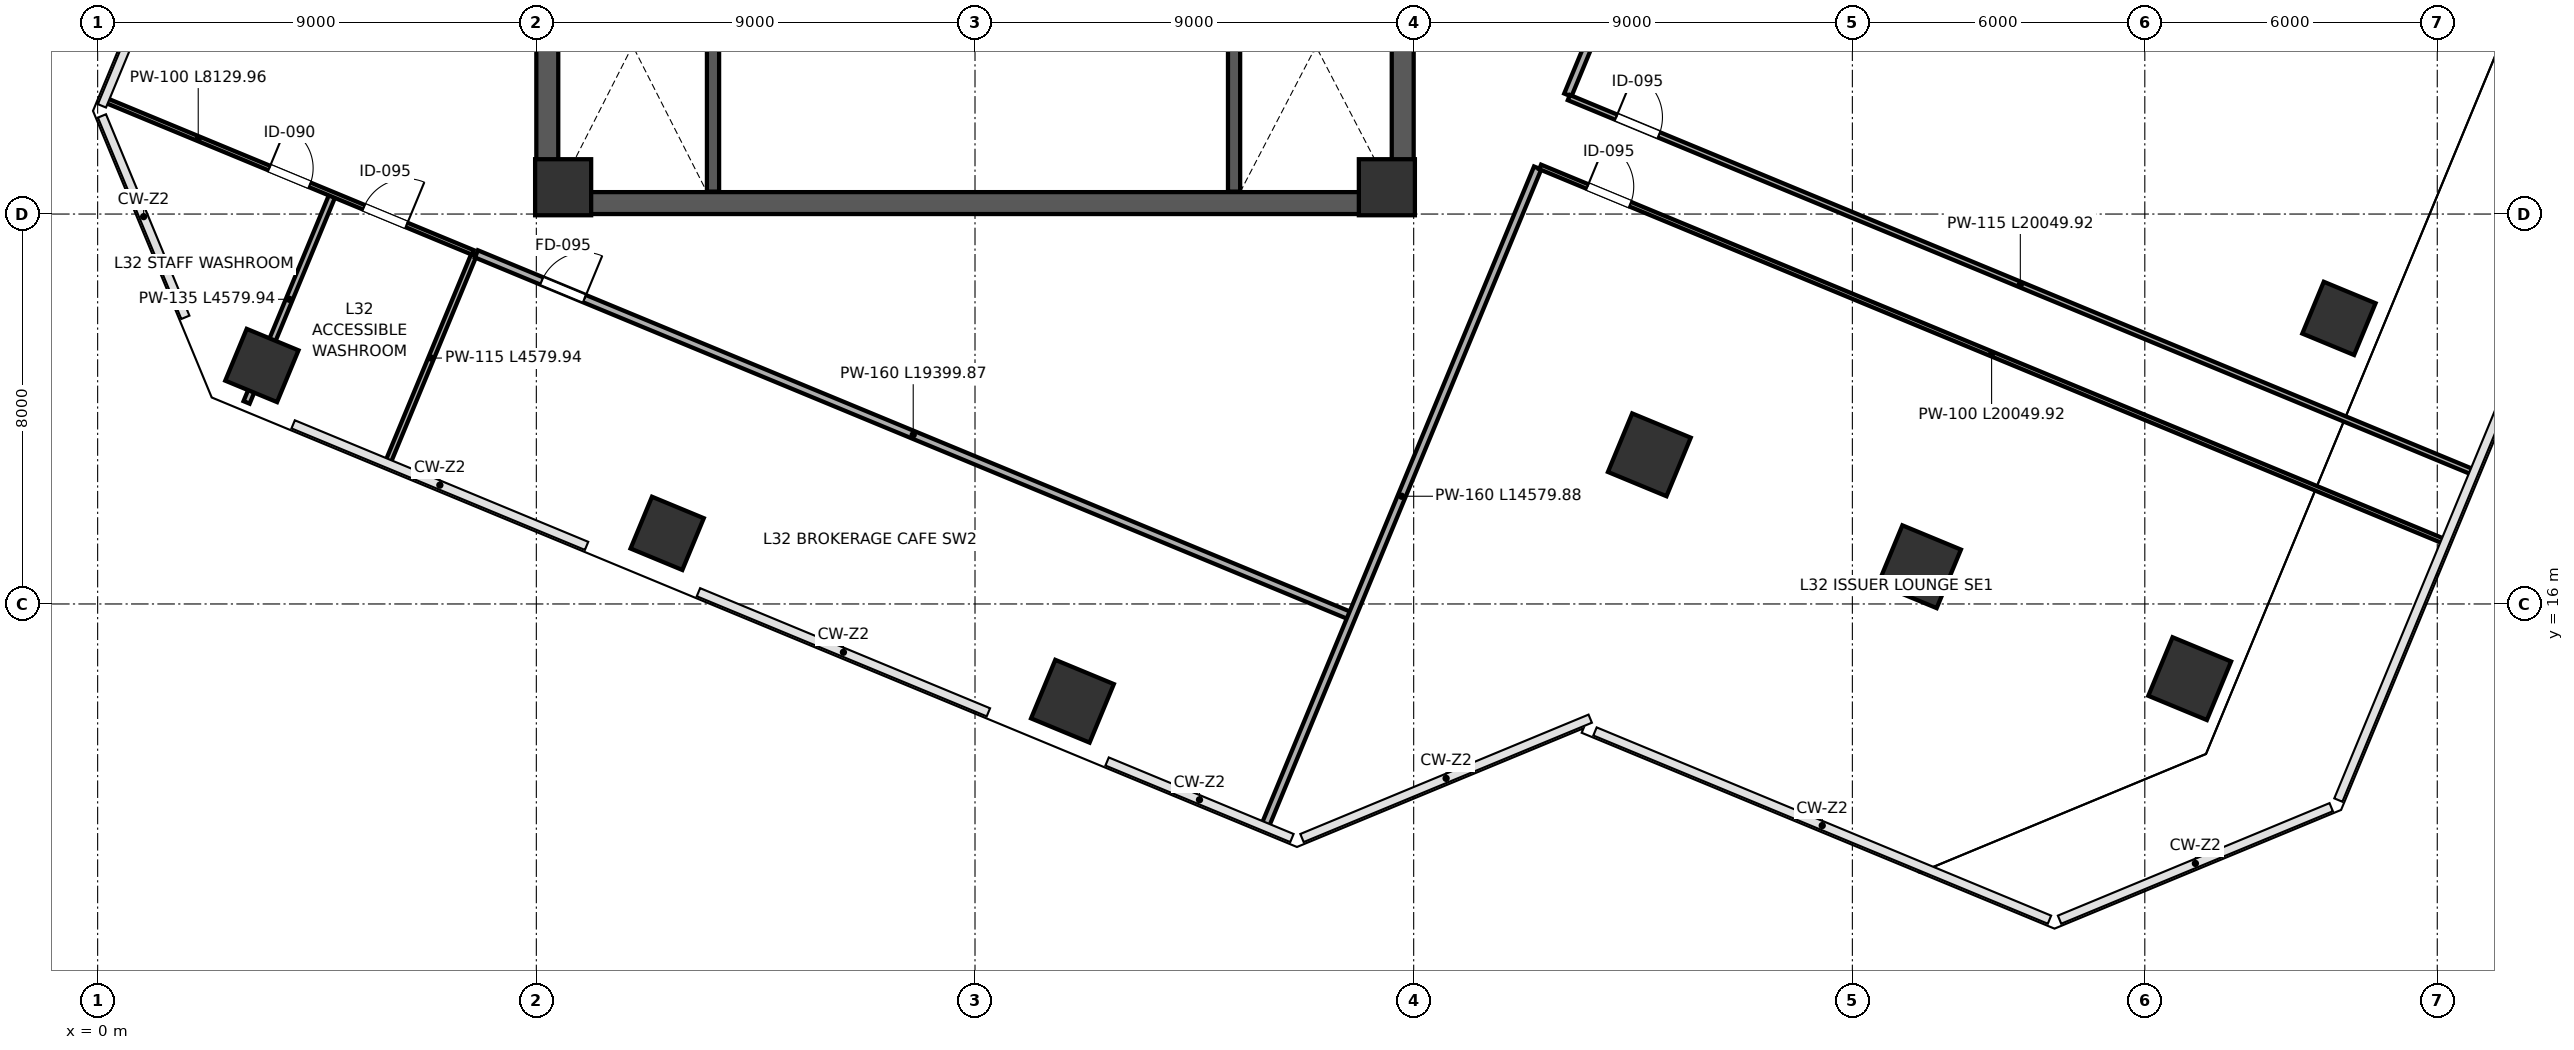
"""IFC4 building model, lengths in metres.
Left out: names, types, materials, properties, quantities, classifications, styles, units other than length and angle.
Written with IfcOpenShell. Run it as: python <this file> out.ifc"""

import sys

from ifc_helpers import new_model, si_unit, direction, frame, frame_2d, origin, origin_2d, place, context, subcontext, project, spatial, rectangle, extrude, clip, halfspace, source, transform, mapped, element, fill, save


model = new_model("IFC4")
c1 = context("Model", 3, precision=1e-05, world=origin(), true_north=direction((0.0, 1.0)))
c2 = subcontext(c1, "Body", "Model", "MODEL_VIEW")
j1 = project(units=[si_unit("LENGTHUNIT", "METRE"), si_unit("PLANEANGLEUNIT", "RADIAN")], contexts=[c1])
p1 = place(None, origin())
s1 = spatial("IfcSite", under=j1, at=p1, CompositionType="ELEMENT")
p2 = place(p1, origin())
s2 = spatial("IfcBuilding", under=s1, at=p2, CompositionType="ELEMENT")
p3 = place(p2, frame((0.0, 0.0, 145.6)))
s3 = spatial("IfcBuildingStorey", under=s2, at=p3, CompositionType="ELEMENT", Elevation=145.6)
m1 = source(origin(), c2, "Body", "SweptSolid", [
    extrude(rectangle(XDim=1.15, YDim=1.15, at=origin_2d()), origin(), (0.0, 0.0, 1.0), 4.198),
])
for number, where, z_axis, x_axis in (
    (1, (9.55, 24.55, 0.001), (0.0, 0.0, 1.0), (1.0, 0.0, 0.0)),
    (2, (26.45, 24.55, 0.001), (0.0, 0.0, 1.0), (1.0, 0.0, 0.0)),
):
    element("IfcColumn", number, at=place(p3, frame(where, z_axis=z_axis, x_axis=x_axis)), inside=s3, PredefinedType="COLUMN", context=c2, shape_type="MappedRepresentation", body=[
        mapped(m1, transform((0.0, 0.0, 0.0), scale=1.0)),
    ])
p4 = place(p3, frame((3.369, 20.893, 0.0), z_axis=(-0.05633354189, 0.094235904434, 0.99395479091), x_axis=(0.988159955679, 0.147562370098, 0.042014865498)))
e3 = element("IfcColumn", 3, at=p4, inside=s3, PredefinedType="COLUMN", context=c2, shape_type="Clipping", body=[
    clip(clip(extrude(rectangle(XDim=1.15, YDim=1.15, at=origin_2d()), origin(), (0.0, 0.0, 1.0), 4.226), halfspace(frame((0.0, 0.0, 0.084), z_axis=(0.0, 0.0, -1.0), x_axis=(1.0, 0.0, 0.0)), False)), halfspace(frame((0.0, 0.0, 4.142), z_axis=(0.0, 0.0, 1.0), x_axis=(1.0, 0.0, 0.0)), False)),
])
p5 = place(p3, frame((11.684, 17.449, 0.0), z_axis=(-0.074735008578, 0.051579312659, 0.995868592234), x_axis=(0.838432295846, 0.543896794983, 0.034749988351)))
e4 = element("IfcColumn", 4, at=p5, inside=s3, PredefinedType="COLUMN", context=c2, shape_type="Clipping", body=[
    clip(clip(extrude(rectangle(XDim=1.15, YDim=1.15, at=origin_2d()), origin(), (0.0, 0.0, 1.0), 4.217), halfspace(frame((0.0, 0.0, 0.069), z_axis=(0.0, 0.0, -1.0), x_axis=(1.0, 0.0, 0.0)), False)), halfspace(frame((0.0, 0.0, 4.148), z_axis=(0.0, 0.0, 1.0), x_axis=(1.0, 0.0, 0.0)), False)),
])
p6 = place(p3, frame((19.999, 14.004, 0.0), z_axis=(-0.093005415961, 0.008797027521, 0.995626739752), x_axis=(0.466314790202, 0.883896158504, 0.035750488389)))
e5 = element("IfcColumn", 5, at=p6, inside=s3, PredefinedType="COLUMN", context=c2, shape_type="Clipping", body=[
    clip(clip(extrude(rectangle(XDim=1.3, YDim=1.3, at=origin_2d()), origin(), (0.0, 0.0, 1.0), 4.219), halfspace(frame((0.0, 0.0, 0.08), z_axis=(0.0, 0.0, -1.0), x_axis=(1.0, 0.0, 0.0)), False)), halfspace(frame((0.0, 0.0, 4.138), z_axis=(0.0, 0.0, 1.0), x_axis=(1.0, 0.0, 0.0)), False)),
])
p7 = place(p3, frame((31.835, 19.06, 0.0), z_axis=(-0.067529534187, -0.052761068305, 0.996321249238), x_axis=(-0.268358481598, 0.962760731488, 0.032794805374)))
e6 = element("IfcColumn", 6, at=p7, inside=s3, PredefinedType="COLUMN", context=c2, shape_type="Clipping", body=[
    clip(clip(extrude(rectangle(XDim=1.3, YDim=1.3, at=origin_2d()), origin(), (0.0, 0.0, 1.0), 4.216), halfspace(frame((0.0, 0.0, 0.074), z_axis=(0.0, 0.0, -1.0), x_axis=(1.0, 0.0, 0.0)), False)), halfspace(frame((0.0, 0.0, 4.142), z_axis=(0.0, 0.0, 1.0), x_axis=(1.0, 0.0, 0.0)), False)),
])
p8 = place(p3, frame((37.378, 16.764, 0.0), z_axis=(-0.079526245915, -0.08108558407, 0.993529417917), x_axis=(-0.393368525227, 0.91835295243, 0.043463296284)))
e7 = element("IfcColumn", 7, at=p8, inside=s3, PredefinedType="COLUMN", context=c2, shape_type="Clipping", body=[
    clip(clip(extrude(rectangle(XDim=1.3, YDim=1.3, at=origin_2d()), origin(), (0.0, 0.0, 1.0), 4.227), halfspace(frame((0.0, 0.0, 0.098), z_axis=(0.0, 0.0, -1.0), x_axis=(1.0, 0.0, 0.0)), False)), halfspace(frame((0.0, 0.0, 4.129), z_axis=(0.0, 0.0, 1.0), x_axis=(1.0, 0.0, 0.0)), False)),
])
p9 = place(p3, frame((42.921, 14.468, 0.0), z_axis=(-0.091368942886, -0.109205449368, 0.989811035554), x_axis=(-0.465516290855, 0.883360349863, 0.054489221308)))
e8 = element("IfcColumn", 8, at=p9, inside=s3, PredefinedType="COLUMN", context=c2, shape_type="Clipping", body=[
    clip(clip(extrude(rectangle(XDim=1.3, YDim=1.3, at=origin_2d()), origin(), (0.0, 0.0, 1.0), 4.243), halfspace(frame((0.0, 0.0, 0.123), z_axis=(0.0, 0.0, -1.0), x_axis=(1.0, 0.0, 0.0)), False)), halfspace(frame((0.0, 0.0, 4.12), z_axis=(0.0, 0.0, 1.0), x_axis=(1.0, 0.0, 0.0)), False)),
])
p10 = place(p3, frame((45.983, 21.859, 0.0), z_axis=(-0.053555242606, -0.125422923006, 0.99065681564), x_axis=(-0.700788678564, 0.71145727681, 0.052189762124)))
e9 = element("IfcColumn", 9, at=p10, inside=s3, PredefinedType="COLUMN", context=c2, shape_type="Clipping", body=[
    clip(clip(extrude(rectangle(XDim=1.15, YDim=1.15, at=origin_2d()), origin(), (0.0, 0.0, 1.0), 4.24), halfspace(frame((0.0, 0.0, 0.104), z_axis=(0.0, 0.0, -1.0), x_axis=(1.0, 0.0, 0.0)), False)), halfspace(frame((0.0, 0.0, 4.135), z_axis=(0.0, 0.0, 1.0), x_axis=(1.0, 0.0, 0.0)), False)),
])
p11 = place(p3, frame((9.225, 24.45, 0.0), z_axis=(0.0, 0.0, 1.0), x_axis=(0.0, 1.0, 0.0)))
e10 = element("IfcWall", 10, at=p11, inside=s3, PredefinedType="SHEAR", context=c2, shape_type="SweptSolid", body=[
    extrude(rectangle(XDim=15.1, YDim=0.45, at=frame_2d((7.55, 0.0))), origin(), (0.0, 0.0, 1.0), 3.96),
])
p12 = place(p3, frame((26.775, 24.45, 0.0), z_axis=(0.0, 0.0, 1.0), x_axis=(0.0, 1.0, 0.0)))
e11 = element("IfcWall", 11, at=p12, inside=s3, PredefinedType="SHEAR", context=c2, shape_type="SweptSolid", body=[
    extrude(rectangle(XDim=15.1, YDim=0.45, at=frame_2d((7.55, 0.0))), origin(), (0.0, 0.0, 1.0), 3.96),
])
p13 = place(p12, frame((8.6, 0.0, 0.0)))
e12 = element("IfcOpeningElement", 12, at=p13, cuts=e11, PredefinedType="OPENING", context=c2, shape_type="SweptSolid", body=[
    extrude(rectangle(XDim=1.15, YDim=2.2, at=frame_2d((0.575, 1.1))), frame((0.0, 0.235, 0.0), z_axis=(0.0, -1.0, 0.0), x_axis=(1.0, 0.0, 0.0)), (0.0, 0.0, 1.0), 0.47),
])
p14 = place(p3, frame((9.0, 24.225, 0.0), z_axis=(0.0, 0.0, 1.0), x_axis=(1.0, 0.0, 0.0)))
e13 = element("IfcWall", 13, at=p14, inside=s3, PredefinedType="SHEAR", context=c2, shape_type="SweptSolid", body=[
    extrude(rectangle(XDim=18.0, YDim=0.45, at=frame_2d((9.0, 0.0))), origin(), (0.0, 0.0, 1.0), 3.96),
])
p15 = place(p3, frame((12.625, 24.46, 0.0), z_axis=(0.0, 0.0, 1.0), x_axis=(0.0, 1.0, 0.0)))
e14 = element("IfcWall", 14, at=p15, inside=s3, PredefinedType="SHEAR", context=c2, shape_type="SweptSolid", body=[
    extrude(rectangle(XDim=7.49, YDim=0.25, at=frame_2d((3.745, 0.0))), origin(), (0.0, 0.0, 1.0), 3.96),
])
p16 = place(p15, frame((5.85, 0.0, 0.0)))
e15 = element("IfcOpeningElement", 15, at=p16, cuts=e14, PredefinedType="OPENING", context=c2, shape_type="SweptSolid", body=[
    extrude(rectangle(XDim=1.15, YDim=2.2, at=frame_2d((0.575, 1.1))), frame((0.0, 0.135, 0.0), z_axis=(0.0, -1.0, 0.0), x_axis=(1.0, 0.0, 0.0)), (0.0, 0.0, 1.0), 0.27),
])
p17 = place(p3, frame((23.315, 24.46, 0.0), z_axis=(0.0, 0.0, 1.0), x_axis=(0.0, 1.0, 0.0)))
e16 = element("IfcWall", 16, at=p17, inside=s3, PredefinedType="SHEAR", context=c2, shape_type="SweptSolid", body=[
    extrude(rectangle(XDim=7.49, YDim=0.25, at=frame_2d((3.745, 0.0))), origin(), (0.0, 0.0, 1.0), 3.96),
])
p18 = place(p3, frame((3.055, 20.135, 0.0), z_axis=(0.0, 0.0, 1.0), x_axis=(0.382676631985, 0.923882349292, 0.0)))
e17 = element("IfcWall", 17, at=p18, inside=s3, PredefinedType="PARTITIONING", context=c2, shape_type="SweptSolid", body=[
    extrude(rectangle(XDim=4.58, YDim=0.135, at=frame_2d((2.29, 0.0))), origin(), (0.0, 0.0, 1.0), 3.195),
])
p19 = place(p3, frame((5.966, 18.93, 0.0), z_axis=(0.0, 0.0, 1.0), x_axis=(0.382676631985, 0.923882349292, 0.0)))
e18 = element("IfcWall", 18, at=p19, inside=s3, PredefinedType="PARTITIONING", context=c2, shape_type="SweptSolid", body=[
    extrude(rectangle(XDim=4.58, YDim=0.115, at=frame_2d((2.29, 0.0))), origin(), (0.0, 0.0, 1.0), 3.195),
])
p20 = place(p3, frame((0.186, 26.325, 0.0), z_axis=(0.0, 0.0, 1.0), x_axis=(0.923871890562, -0.382701881142, 0.0)))
e19 = element("IfcWall", 19, at=p20, inside=s3, PredefinedType="PARTITIONING", context=c2, shape_type="SweptSolid", body=[
    extrude(rectangle(XDim=8.13, YDim=0.1, at=frame_2d((4.065, 0.0))), origin(), (0.0, 0.0, 1.0), 3.96),
])
p21 = place(p20, frame((3.61, 0.0, 0.0)))
e20 = element("IfcOpeningElement", 20, at=p21, cuts=e19, PredefinedType="OPENING", context=c2, shape_type="SweptSolid", body=[
    extrude(rectangle(XDim=0.9, YDim=2.15, at=frame_2d((0.45, 1.075))), frame((0.0, 0.06, 0.0), z_axis=(0.0, -1.0, 0.0), x_axis=(1.0, 0.0, 0.0)), (0.0, 0.0, 1.0), 0.12),
])
p22 = place(p20, frame((5.71, 0.0, 0.0)))
e21 = element("IfcOpeningElement", 21, at=p22, cuts=e19, PredefinedType="OPENING", context=c2, shape_type="SweptSolid", body=[
    extrude(rectangle(XDim=0.95, YDim=2.15, at=frame_2d((0.475, 1.075))), frame((0.0, 0.06, 0.0), z_axis=(0.0, -1.0, 0.0), x_axis=(1.0, 0.0, 0.0)), (0.0, 0.0, 1.0), 0.12),
])
p23 = place(p3, frame((7.771, 23.183, 0.0), z_axis=(0.0, 0.0, 1.0), x_axis=(0.923878020857, -0.382687081801, 0.0)))
e22 = element("IfcWall", 22, at=p23, inside=s3, PredefinedType="PARTITIONING", context=c2, shape_type="SweptSolid", body=[
    extrude(rectangle(XDim=19.4, YDim=0.16, at=frame_2d((9.7, 0.0))), origin(), (0.0, 0.0, 1.0), 3.96),
])
p24 = place(p23, frame((1.45, 0.0, 0.0)))
e23 = element("IfcOpeningElement", 23, at=p24, cuts=e22, PredefinedType="OPENING", context=c2, shape_type="SweptSolid", body=[
    extrude(rectangle(XDim=0.95, YDim=2.15, at=frame_2d((0.475, 1.075))), frame((0.0, 0.09, 0.0), z_axis=(0.0, -1.0, 0.0), x_axis=(1.0, 0.0, 0.0)), (0.0, 0.0, 1.0), 0.18),
])
p25 = place(p3, frame((30.162, 26.442, 0.0), z_axis=(0.0, 0.0, 1.0), x_axis=(0.382688600046, 0.923877391971, 0.0)))
e24 = element("IfcWall", 24, at=p25, inside=s3, PredefinedType="PARTITIONING", context=c2, shape_type="SweptSolid", body=[
    extrude(rectangle(XDim=17.84, YDim=0.16, at=frame_2d((8.92, 0.0))), origin(), (0.0, 0.0, 1.0), 3.195),
])
p26 = place(p3, frame((23.963, 11.475, 0.0), z_axis=(0.0, 0.0, 1.0), x_axis=(0.382686018031, 0.923878461489, 0.0)))
e25 = element("IfcWall", 25, at=p26, inside=s3, PredefinedType="PARTITIONING", context=c2, shape_type="SweptSolid", body=[
    extrude(rectangle(XDim=14.58, YDim=0.16, at=frame_2d((7.29, 0.0))), origin(), (0.0, 0.0, 1.0), 3.96),
])
p27 = place(p3, frame((30.184, 26.39, 0.0), z_axis=(0.0, 0.0, 1.0), x_axis=(0.923877920754, -0.382687323468, 0.0)))
e26 = element("IfcWall", 26, at=p27, inside=s3, PredefinedType="PARTITIONING", context=c2, shape_type="SweptSolid", body=[
    extrude(rectangle(XDim=20.05, YDim=0.115, at=frame_2d((10.025, 0.0))), origin(), (0.0, 0.0, 1.0), 3.252),
])
p28 = place(p27, frame((1.05, 0.0, 0.0)))
e27 = element("IfcOpeningElement", 27, at=p28, cuts=e26, PredefinedType="OPENING", context=c2, shape_type="SweptSolid", body=[
    extrude(rectangle(XDim=0.95, YDim=2.15, at=frame_2d((0.475, 1.075))), frame((0.0, 0.067, 0.0), z_axis=(0.0, -1.0, 0.0), x_axis=(1.0, 0.0, 0.0)), (0.0, 0.0, 1.0), 0.135),
])
p29 = place(p3, frame((29.595, 24.967, 0.0), z_axis=(0.0, 0.0, 1.0), x_axis=(0.923882225843, -0.382676930022, 0.0)))
e28 = element("IfcWall", 28, at=p29, inside=s3, PredefinedType="PARTITIONING", context=c2, shape_type="SweptSolid", body=[
    extrude(rectangle(XDim=20.05, YDim=0.1, at=frame_2d((10.025, 0.0))), origin(), (0.0, 0.0, 1.0), 3.252),
])
p30 = place(p29, frame((1.05, 0.0, 0.0)))
e29 = element("IfcOpeningElement", 29, at=p30, cuts=e28, PredefinedType="OPENING", context=c2, shape_type="SweptSolid", body=[
    extrude(rectangle(XDim=0.95, YDim=2.15, at=frame_2d((0.475, 1.075))), frame((0.0, 0.06, 0.0), z_axis=(0.0, -1.0, 0.0), x_axis=(1.0, 0.0, 0.0)), (0.0, 0.0, 1.0), 0.12),
])
m2 = source(origin(), c2, "Body", "SweptSolid", [
    extrude(rectangle(XDim=0.9, YDim=2.15, at=frame_2d((0.45, 1.075))), frame((0.0, 0.025, 0.0), z_axis=(0.0, -1.0, 0.0), x_axis=(1.0, 0.0, 0.0)), (0.0, 0.0, 1.0), 0.05),
])
p31 = place(p21, origin())
e30 = element("IfcDoor", 30, at=p31, inside=s3, OperationType="SINGLE_SWING_LEFT", PredefinedType="DOOR", context=c2, shape_type="MappedRepresentation", body=[
    mapped(m2, transform((0.0, 0.0, 0.0), scale=1.0)),
])
fill(e20, e30)
m3 = source(origin(), c2, "Body", "SweptSolid", [
    extrude(rectangle(XDim=0.95, YDim=2.15, at=frame_2d((0.475, 1.075))), frame((0.0, 0.025, 0.0), z_axis=(0.0, -1.0, 0.0), x_axis=(1.0, 0.0, 0.0)), (0.0, 0.0, 1.0), 0.05),
])
p32 = place(p22, origin())
e31 = element("IfcDoor", 31, at=p32, inside=s3, OperationType="SINGLE_SWING_RIGHT", PredefinedType="DOOR", context=c2, shape_type="MappedRepresentation", body=[
    mapped(m3, transform((0.0, 0.0, 0.0), scale=1.0)),
])
fill(e21, e31)
m4 = source(origin(), c2, "Body", "SweptSolid", [
    extrude(rectangle(XDim=0.95, YDim=2.15, at=frame_2d((0.475, 1.075))), frame((0.0, 0.025, 0.0), z_axis=(0.0, -1.0, 0.0), x_axis=(1.0, 0.0, 0.0)), (0.0, 0.0, 1.0), 0.05),
])
p33 = place(p24, origin())
e32 = element("IfcDoor", 32, at=p33, inside=s3, OperationType="SINGLE_SWING_RIGHT", PredefinedType="DOOR", context=c2, shape_type="MappedRepresentation", body=[
    mapped(m4, transform((0.0, 0.0, 0.0), scale=1.0)),
])
fill(e23, e32)
p34 = place(p28, origin())
e33 = element("IfcDoor", 33, at=p34, inside=s3, OperationType="SINGLE_SWING_LEFT", PredefinedType="DOOR", context=c2, shape_type="MappedRepresentation", body=[
    mapped(m3, transform((0.0, 0.0, 0.0), scale=1.0)),
])
fill(e27, e33)
p35 = place(p30, origin())
e34 = element("IfcDoor", 34, at=p35, inside=s3, OperationType="SINGLE_SWING_LEFT", PredefinedType="DOOR", context=c2, shape_type="MappedRepresentation", body=[
    mapped(m3, transform((0.0, 0.0, 0.0), scale=1.0)),
])
fill(e29, e34)
save(model, sys.argv[1])
